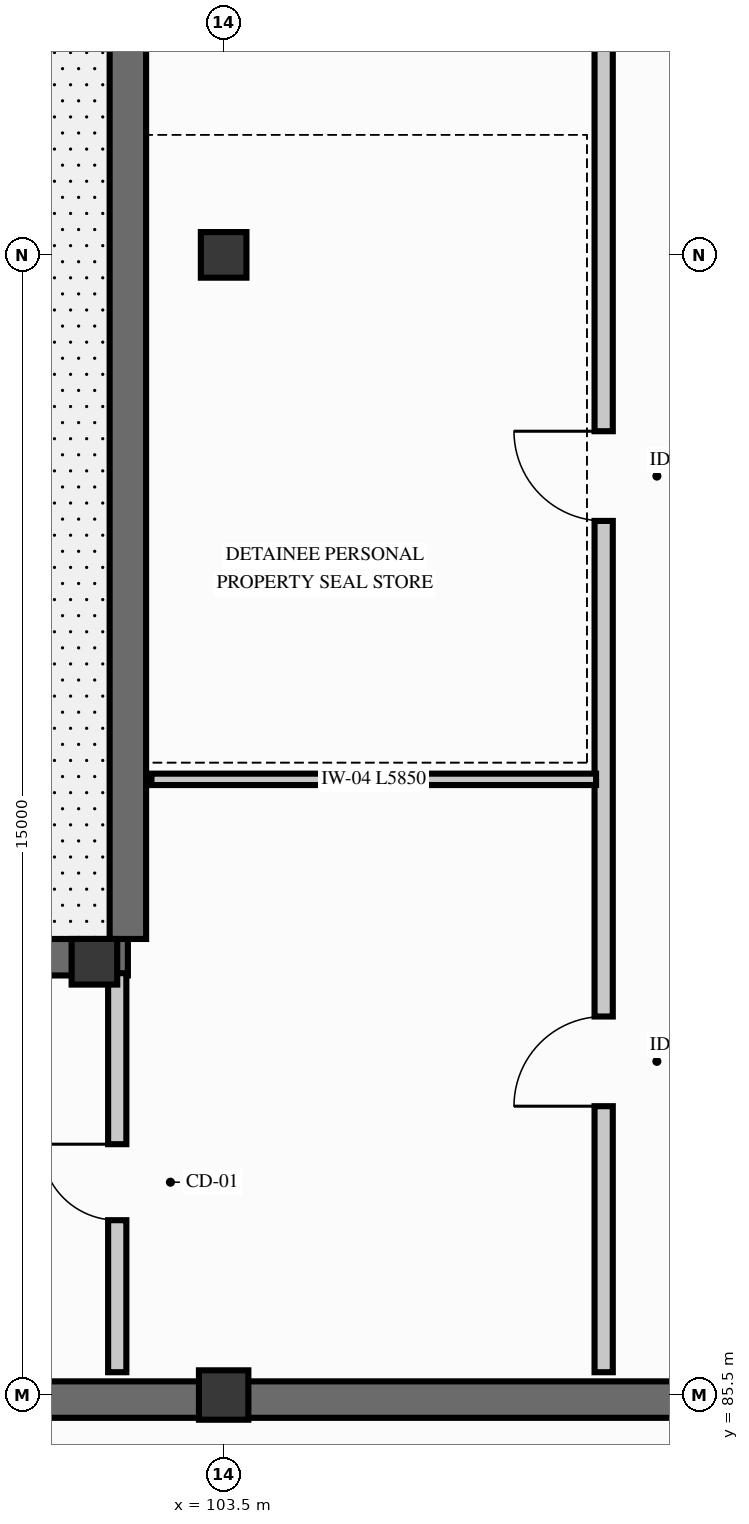
"""IFC4 building model, lengths in metres.
Left out: names, types, materials, properties, quantities, classifications, styles, units other than length and angle.
Written with IfcOpenShell. Run it as: python <this file> out.ifc"""

import sys

from ifc_helpers import new_model, si_unit, direction, frame, frame_2d, origin, origin_2d, place, context, subcontext, project, spatial, rectangle, extrude, element, fill, save


model = new_model("IFC4")
c1 = context("Model", 3, precision=1e-05, world=origin(), true_north=direction((0.0, 1.0)))
c2 = subcontext(c1, "Body", "Model", "MODEL_VIEW")
j1 = project(units=[si_unit("LENGTHUNIT", "METRE"), si_unit("PLANEANGLEUNIT", "RADIAN")], contexts=[c1])
p1 = place(None, origin())
s1 = spatial("IfcSite", under=j1, at=p1, CompositionType="ELEMENT")
p2 = place(p1, origin())
s2 = spatial("IfcBuilding", under=s1, at=p2, CompositionType="ELEMENT")
p3 = place(p2, origin())
s3 = spatial("IfcBuildingStorey", under=s2, at=p3, CompositionType="ELEMENT", Elevation=0.0)
p4 = place(p3, frame((101.8, 91.2, 0.0), z_axis=(0.0, 0.0, 1.0), x_axis=(1.0, 0.0, 0.0)))
e1 = element("IfcColumn", 1, at=p4, inside=s3, PredefinedType="COLUMN", context=c2, shape_type="SweptSolid", body=[
    extrude(rectangle(XDim=0.6, YDim=0.6, at=origin_2d()), origin(), (0.0, 0.0, 1.0), 4.78),
])
p5 = place(p3, frame((103.5, 85.5, 0.0), z_axis=(0.0, 0.0, 1.0), x_axis=(1.0, 0.0, 0.0)))
e2 = element("IfcColumn", 2, at=p5, inside=s3, PredefinedType="COLUMN", context=c2, shape_type="SweptSolid", body=[
    extrude(rectangle(XDim=0.65, YDim=0.65, at=origin_2d()), origin(), (0.0, 0.0, 1.0), 4.84),
])
p6 = place(p3, frame((103.5, 100.5, 0.0), z_axis=(0.0, 0.0, 1.0), x_axis=(1.0, 0.0, 0.0)))
e3 = element("IfcColumn", 3, at=p6, inside=s3, PredefinedType="COLUMN", context=c2, shape_type="SweptSolid", body=[
    extrude(rectangle(XDim=0.6, YDim=0.6, at=origin_2d()), origin(), (0.0, 0.0, 1.0), 4.84),
])
p7 = place(p3, frame((28.5, 85.44, 0.0), z_axis=(0.0, 0.0, 1.0), x_axis=(1.0, 0.0, 0.0)))
e4 = element("IfcWall", 4, at=p7, inside=s3, PredefinedType="SOLIDWALL", context=c2, shape_type="SweptSolid", body=[
    extrude(rectangle(XDim=95.25, YDim=0.48, at=frame_2d((47.625, 0.0))), origin(), (0.0, 0.0, 1.0), 4.88),
])
p8 = place(p7, frame((54.4, 0.0, 0.0), z_axis=(0.0, 0.0, 1.0), x_axis=(-1.0, 0.0, 0.0)))
e5 = element("IfcOpeningElement", 5, at=p8, cuts=e4, PredefinedType="OPENING", context=c2, shape_type="SweptSolid", body=[
    extrude(rectangle(XDim=1.2, YDim=2.3, at=frame_2d((0.6, 1.15))), frame((0.0, 0.25, 0.0), z_axis=(0.0, -1.0, 0.0), x_axis=(1.0, 0.0, 0.0)), (0.0, 0.0, 1.0), 0.5),
])
p9 = place(p7, frame((87.1, 0.0, 0.0), z_axis=(0.0, 0.0, 1.0), x_axis=(-1.0, 0.0, 0.0)))
e6 = element("IfcOpeningElement", 6, at=p9, cuts=e4, PredefinedType="OPENING", context=c2, shape_type="SweptSolid", body=[
    extrude(rectangle(XDim=4.8, YDim=3.6, at=frame_2d((2.4, 1.8))), frame((0.0, 0.25, 0.0), z_axis=(0.0, -1.0, 0.0), x_axis=(1.0, 0.0, 0.0)), (0.0, 0.0, 1.0), 0.5),
])
p10 = place(p7, frame((94.65, 0.0, 0.0), z_axis=(0.0, 0.0, 1.0), x_axis=(-1.0, 0.0, 0.0)))
e7 = element("IfcOpeningElement", 7, at=p10, cuts=e4, PredefinedType="OPENING", context=c2, shape_type="SweptSolid", body=[
    extrude(rectangle(XDim=6.0, YDim=2.8, at=frame_2d((3.0, 1.4))), frame((0.0, 0.25, 0.0), z_axis=(0.0, -1.0, 0.0), x_axis=(1.0, 0.0, 0.0)), (0.0, 0.0, 1.0), 0.5),
])
p11 = place(p7, frame((1.65, 0.0, 1.35)))
e8 = element("IfcOpeningElement", 8, at=p11, cuts=e4, PredefinedType="OPENING", context=c2, shape_type="SweptSolid", body=[
    extrude(rectangle(XDim=1.4, YDim=2.2, at=frame_2d((0.7, 1.1))), frame((0.0, 0.25, 0.0), z_axis=(0.0, -1.0, 0.0), x_axis=(1.0, 0.0, 0.0)), (0.0, 0.0, 1.0), 0.5),
])
p12 = place(p7, frame((5.85, 0.0, 1.35)))
e9 = element("IfcOpeningElement", 9, at=p12, cuts=e4, PredefinedType="OPENING", context=c2, shape_type="SweptSolid", body=[
    extrude(rectangle(XDim=1.2, YDim=2.1, at=frame_2d((0.6, 1.05))), frame((0.0, 0.25, 0.0), z_axis=(0.0, -1.0, 0.0), x_axis=(1.0, 0.0, 0.0)), (0.0, 0.0, 1.0), 0.5),
])
p13 = place(p7, frame((14.25, 0.0, 1.35)))
e10 = element("IfcOpeningElement", 10, at=p13, cuts=e4, PredefinedType="OPENING", context=c2, shape_type="SweptSolid", body=[
    extrude(rectangle(XDim=1.0, YDim=1.6, at=frame_2d((0.5, 0.8))), frame((0.0, 0.25, 0.0), z_axis=(0.0, -1.0, 0.0), x_axis=(1.0, 0.0, 0.0)), (0.0, 0.0, 1.0), 0.5),
])
p14 = place(p7, frame((22.65, 0.0, 1.35)))
e11 = element("IfcOpeningElement", 11, at=p14, cuts=e4, PredefinedType="OPENING", context=c2, shape_type="SweptSolid", body=[
    extrude(rectangle(XDim=1.2, YDim=2.1, at=frame_2d((0.6, 1.05))), frame((0.0, 0.25, 0.0), z_axis=(0.0, -1.0, 0.0), x_axis=(1.0, 0.0, 0.0)), (0.0, 0.0, 1.0), 0.5),
])
p15 = place(p7, frame((39.45, 0.0, 1.35)))
e12 = element("IfcOpeningElement", 12, at=p15, cuts=e4, PredefinedType="OPENING", context=c2, shape_type="SweptSolid", body=[
    extrude(rectangle(XDim=1.2, YDim=2.1, at=frame_2d((0.6, 1.05))), frame((0.0, 0.25, 0.0), z_axis=(0.0, -1.0, 0.0), x_axis=(1.0, 0.0, 0.0)), (0.0, 0.0, 1.0), 0.5),
])
p16 = place(p7, frame((47.85, 0.0, 1.35)))
e13 = element("IfcOpeningElement", 13, at=p16, cuts=e4, PredefinedType="OPENING", context=c2, shape_type="SweptSolid", body=[
    extrude(rectangle(XDim=1.0, YDim=1.6, at=frame_2d((0.5, 0.8))), frame((0.0, 0.25, 0.0), z_axis=(0.0, -1.0, 0.0), x_axis=(1.0, 0.0, 0.0)), (0.0, 0.0, 1.0), 0.5),
])
p17 = place(p3, frame((85.76, 91.26, 0.0), z_axis=(0.0, 0.0, 1.0), x_axis=(1.0, 0.0, 0.0)))
e14 = element("IfcWall", 14, at=p17, inside=s3, PredefinedType="SOLIDWALL", context=c2, shape_type="SweptSolid", body=[
    extrude(rectangle(XDim=16.48, YDim=0.48, at=frame_2d((8.24, 0.0))), origin(), (0.0, 0.0, 1.0), 4.74),
])
p18 = place(p3, frame((102.24, 91.5, 0.0), z_axis=(0.0, 0.0, 1.0), x_axis=(0.0, 1.0, 0.0)))
e15 = element("IfcWall", 15, at=p18, inside=s3, PredefinedType="SOLIDWALL", context=c2, shape_type="SweptSolid", body=[
    extrude(rectangle(XDim=17.0, YDim=0.48, at=frame_2d((8.5, 0.0))), origin(), (0.0, 0.0, 1.0), 4.74),
])
p19 = place(p3, frame((108.5, 85.8, 0.0), z_axis=(0.0, 0.0, 1.0), x_axis=(0.0, 1.0, 0.0)))
e16 = element("IfcWall", 16, at=p19, inside=s3, PredefinedType="PARTITIONING", context=c2, shape_type="SweptSolid", body=[
    extrude(rectangle(XDim=30.7, YDim=0.24, at=frame_2d((15.35, 0.0))), origin(), (0.0, 0.0, 1.0), 4.86),
])
p20 = place(p19, frame((3.5, 0.0, 0.0)))
e17 = element("IfcOpeningElement", 17, at=p20, cuts=e16, PredefinedType="OPENING", context=c2, shape_type="SweptSolid", body=[
    extrude(rectangle(XDim=1.18, YDim=2.24, at=frame_2d((0.59, 1.12))), frame((0.0, 0.13, 0.0), z_axis=(0.0, -1.0, 0.0), x_axis=(1.0, 0.0, 0.0)), (0.0, 0.0, 1.0), 0.26),
])
p21 = place(p19, frame((11.2, 0.0, 0.0)))
e18 = element("IfcOpeningElement", 18, at=p21, cuts=e16, PredefinedType="OPENING", context=c2, shape_type="SweptSolid", body=[
    extrude(rectangle(XDim=1.18, YDim=2.24, at=frame_2d((0.59, 1.12))), frame((0.0, 0.13, 0.0), z_axis=(0.0, -1.0, 0.0), x_axis=(1.0, 0.0, 0.0)), (0.0, 0.0, 1.0), 0.26),
])
p22 = place(p19, frame((20.0, 0.0, 0.0)))
e19 = element("IfcOpeningElement", 19, at=p22, cuts=e16, PredefinedType="OPENING", context=c2, shape_type="SweptSolid", body=[
    extrude(rectangle(XDim=1.18, YDim=2.24, at=frame_2d((0.59, 1.12))), frame((0.0, 0.13, 0.0), z_axis=(0.0, -1.0, 0.0), x_axis=(1.0, 0.0, 0.0)), (0.0, 0.0, 1.0), 0.26),
])
p23 = place(p3, frame((102.55, 93.6, 0.0), z_axis=(0.0, 0.0, 1.0), x_axis=(1.0, 0.0, 0.0)))
e20 = element("IfcWall", 20, at=p23, inside=s3, PredefinedType="PARTITIONING", context=c2, shape_type="SweptSolid", body=[
    extrude(rectangle(XDim=5.85, YDim=0.15, at=frame_2d((2.925, 0.0))), origin(), (0.0, 0.0, 1.0), 4.86),
])
p24 = place(p3, frame((102.1, 85.8, 0.0), z_axis=(0.0, 0.0, 1.0), x_axis=(0.0, 1.0, 0.0)))
e21 = element("IfcWall", 21, at=p24, inside=s3, PredefinedType="PARTITIONING", context=c2, shape_type="SweptSolid", body=[
    extrude(rectangle(XDim=5.25, YDim=0.24, at=frame_2d((2.625, 0.0))), origin(), (0.0, 0.0, 1.0), 4.86),
])
p25 = place(p24, frame((2.0, 0.0, 0.0)))
e22 = element("IfcOpeningElement", 22, at=p25, cuts=e21, PredefinedType="OPENING", context=c2, shape_type="SweptSolid", body=[
    extrude(rectangle(XDim=1.0, YDim=2.15, at=frame_2d((0.5, 1.075))), frame((0.0, 0.13, 0.0), z_axis=(0.0, -1.0, 0.0), x_axis=(1.0, 0.0, 0.0)), (0.0, 0.0, 1.0), 0.26),
])
p26 = place(p20, origin())
e23 = element("IfcDoor", 23, at=p26, inside=s3, OperationType="SINGLE_SWING_LEFT", PredefinedType="DOOR", context=c2, shape_type="SweptSolid", body=[
    extrude(rectangle(XDim=1.18, YDim=2.24, at=frame_2d((0.59, 1.12))), frame((0.0, 0.025, 0.0), z_axis=(0.0, -1.0, 0.0), x_axis=(1.0, 0.0, 0.0)), (0.0, 0.0, 1.0), 0.05),
])
fill(e17, e23)
p27 = place(p21, origin())
e24 = element("IfcDoor", 24, at=p27, inside=s3, OperationType="SINGLE_SWING_RIGHT", PredefinedType="DOOR", context=c2, shape_type="SweptSolid", body=[
    extrude(rectangle(XDim=1.18, YDim=2.24, at=frame_2d((0.59, 1.12))), frame((0.0, 0.025, 0.0), z_axis=(0.0, -1.0, 0.0), x_axis=(1.0, 0.0, 0.0)), (0.0, 0.0, 1.0), 0.05),
])
fill(e18, e24)
p28 = place(p25, origin())
e25 = element("IfcDoor", 25, at=p28, inside=s3, OperationType="SINGLE_SWING_RIGHT", PredefinedType="DOOR", context=c2, shape_type="SweptSolid", body=[
    extrude(rectangle(XDim=1.0, YDim=2.15, at=frame_2d((0.5, 1.075))), frame((0.0, 0.025, 0.0), z_axis=(0.0, -1.0, 0.0), x_axis=(1.0, 0.0, 0.0)), (0.0, 0.0, 1.0), 0.05),
])
fill(e22, e25)
save(model, sys.argv[1])
